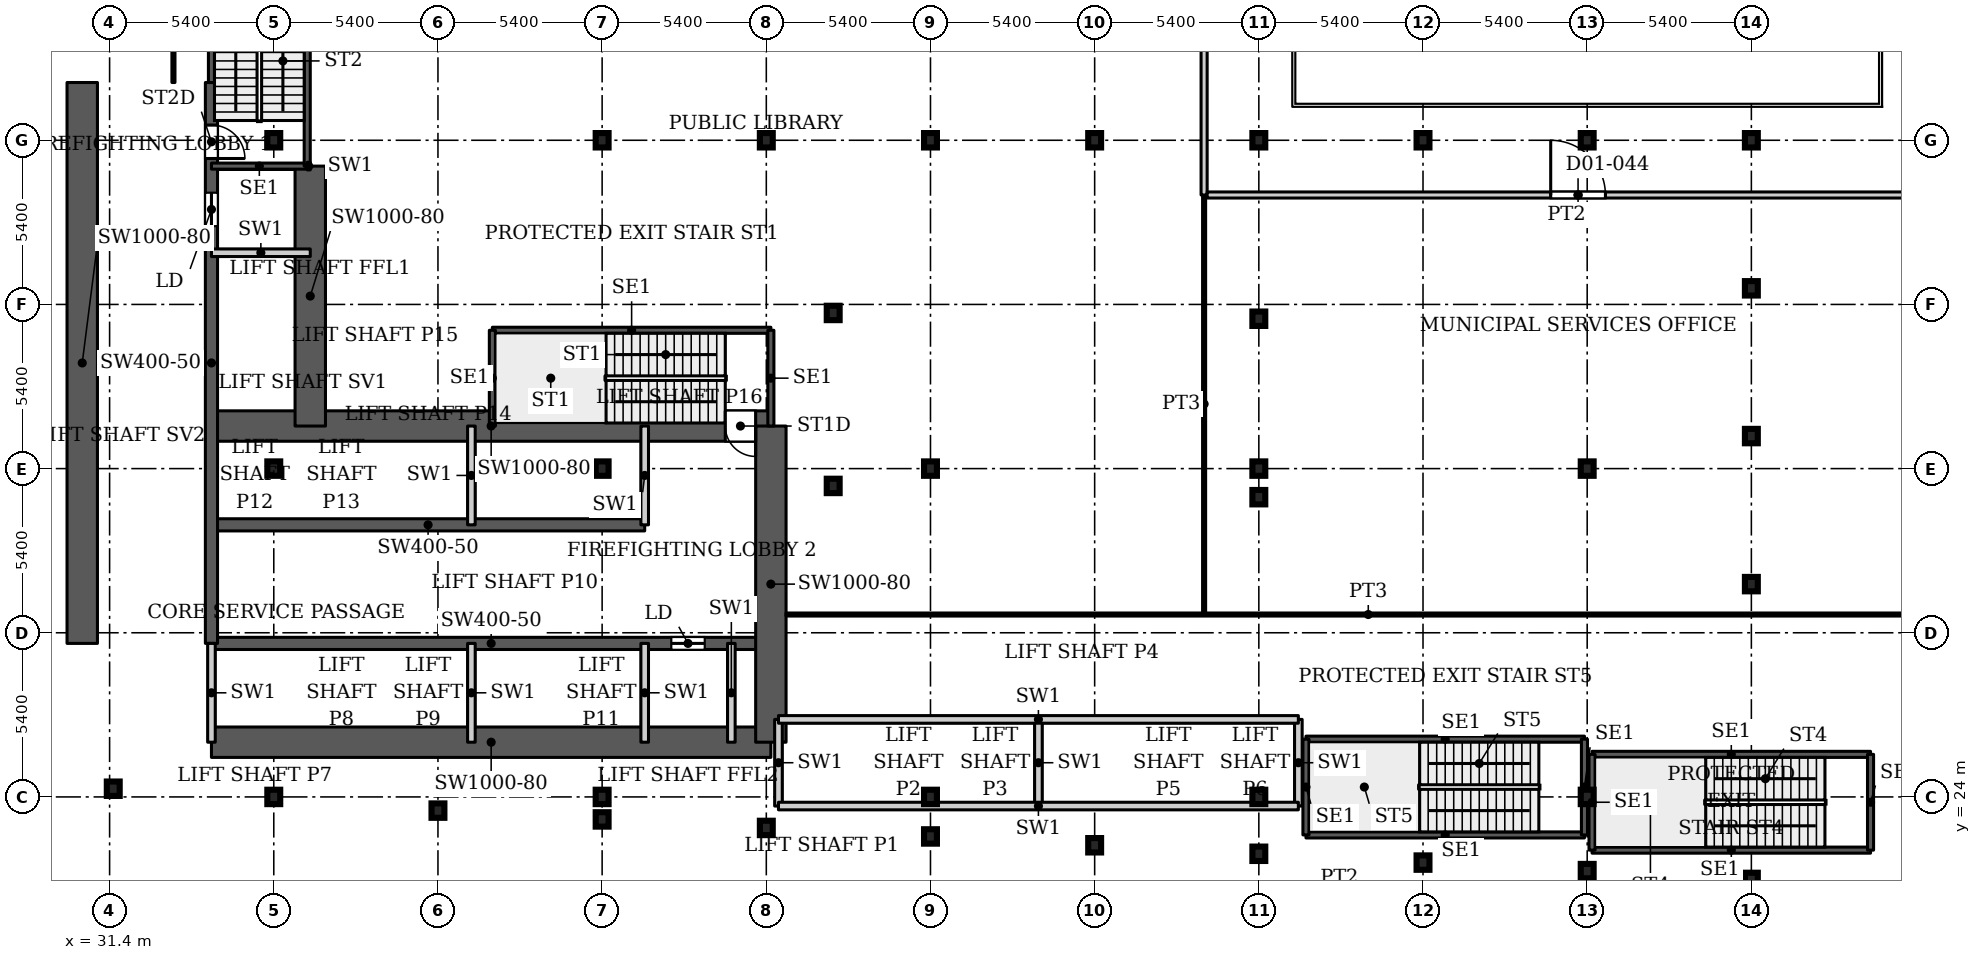
"""IFC4 building model, lengths in metres.
Left out: names, types, materials, properties, quantities, classifications, styles, units other than length and angle.
Written with IfcOpenShell. Run it as: python <this file> out.ifc"""

import sys

from ifc_helpers import new_model, si_unit, direction, frame, frame_2d, origin, origin_2d, place, context, subcontext, project, spatial, rectangle, i_section, extrude, source, transform, mapped, element, fill, save


model = new_model("IFC4")
c1 = context("Model", 3, precision=1e-05, world=origin(), true_north=direction((0.0, 1.0)))
c2 = subcontext(c1, "Body", "Model", "MODEL_VIEW")
j1 = project(units=[si_unit("LENGTHUNIT", "METRE"), si_unit("PLANEANGLEUNIT", "RADIAN")], contexts=[c1])
p1 = place(None, origin())
s1 = spatial("IfcSite", under=j1, at=p1, CompositionType="ELEMENT")
p2 = place(p1, origin())
s2 = spatial("IfcBuilding", under=s1, at=p2, CompositionType="ELEMENT")
p3 = place(p2, frame((0.0, 0.0, 7.5)))
s3 = spatial("IfcBuildingStorey", under=s2, at=p3, CompositionType="ELEMENT", Elevation=7.5)
for number, where, z_axis, x_axis in (
    (1, (36.8, 24.0, 0.0), (0.0, 0.0, 1.0), (1.0, 0.0, 0.0)),
    (2, (47.6, 24.0, 0.0), (0.0, 0.0, 1.0), (1.0, 0.0, 0.0)),
    (3, (58.4, 24.0, 0.0), (0.0, 0.0, 1.0), (1.0, 0.0, 0.0)),
    (4, (69.2, 24.0, 0.0), (0.0, 0.0, 1.0), (1.0, 0.0, 0.0)),
    (5, (80.0, 24.0, 0.0), (0.0, 0.0, 1.0), (1.0, 0.0, 0.0)),
    (6, (36.8, 34.8, 0.0), (0.0, 0.0, 1.0), (1.0, 0.0, 0.0)),
    (7, (47.6, 34.8, 0.0), (0.0, 0.0, 1.0), (1.0, 0.0, 0.0)),
    (8, (58.4, 34.8, 0.0), (0.0, 0.0, 1.0), (1.0, 0.0, 0.0)),
    (9, (69.2, 34.8, 0.0), (0.0, 0.0, 1.0), (1.0, 0.0, 0.0)),
    (10, (80.0, 34.8, 0.0), (0.0, 0.0, 1.0), (1.0, 0.0, 0.0)),
    (11, (36.8, 45.6, 0.0), (0.0, 0.0, 1.0), (1.0, 0.0, 0.0)),
    (12, (47.6, 45.6, 0.0), (0.0, 0.0, 1.0), (1.0, 0.0, 0.0)),
    (13, (58.4, 45.6, 0.0), (0.0, 0.0, 1.0), (1.0, 0.0, 0.0)),
    (14, (69.2, 45.6, 0.0), (0.0, 0.0, 1.0), (1.0, 0.0, 0.0)),
    (15, (80.0, 45.6, 0.0), (0.0, 0.0, 1.0), (1.0, 0.0, 0.0)),
    (16, (85.4, 21.27, 0.0), (0.0, 0.0, 1.0), (1.0, 0.0, 0.0)),
    (17, (80.0, 21.56, 0.0), (0.0, 0.0, 1.0), (1.0, 0.0, 0.0)),
    (18, (74.6, 21.84, 0.0), (0.0, 0.0, 1.0), (1.0, 0.0, 0.0)),
    (19, (69.2, 22.13, 0.0), (0.0, 0.0, 1.0), (1.0, 0.0, 0.0)),
    (20, (63.8, 22.41, 0.0), (0.0, 0.0, 1.0), (1.0, 0.0, 0.0)),
    (21, (58.4, 22.7, 0.0), (0.0, 0.0, 1.0), (1.0, 0.0, 0.0)),
    (22, (53.0, 22.98, 0.0), (0.0, 0.0, 1.0), (1.0, 0.0, 0.0)),
    (23, (47.6, 23.26, 0.0), (0.0, 0.0, 1.0), (1.0, 0.0, 0.0)),
    (24, (42.2, 23.55, 0.0), (0.0, 0.0, 1.0), (1.0, 0.0, 0.0)),
    (25, (31.52, 24.27, 0.0), (0.0, 0.0, 1.0), (1.0, 0.0, 0.0)),
    (26, (53.0, 45.6, 0.0), (0.0, 0.0, 1.0), (1.0, 0.0, 0.0)),
    (27, (63.8, 45.6, 0.0), (0.0, 0.0, 1.0), (1.0, 0.0, 0.0)),
    (28, (74.6, 45.6, 0.0), (0.0, 0.0, 1.0), (1.0, 0.0, 0.0)),
    (29, (85.4, 45.6, 0.0), (0.0, 0.0, 1.0), (1.0, 0.0, 0.0)),
    (30, (85.4, 31.0, 0.0), (0.0, 0.0, 1.0), (1.0, 0.0, 0.0)),
    (31, (69.2, 33.86, 0.0), (0.0, 0.0, 1.0), (1.0, 0.0, 0.0)),
    (32, (55.2, 34.23, 0.0), (0.0, 0.0, 1.0), (1.0, 0.0, 0.0)),
    (33, (85.4, 35.87, 0.0), (0.0, 0.0, 1.0), (1.0, 0.0, 0.0)),
    (34, (69.2, 39.73, 0.0), (0.0, 0.0, 1.0), (1.0, 0.0, 0.0)),
    (35, (55.2, 39.92, 0.0), (0.0, 0.0, 1.0), (1.0, 0.0, 0.0)),
    (36, (85.4, 40.73, 0.0), (0.0, 0.0, 1.0), (1.0, 0.0, 0.0)),
):
    element("IfcColumn", number, at=place(p3, frame(where, z_axis=z_axis, x_axis=x_axis)), inside=s3, PredefinedType="COLUMN", context=c2, shape_type="SweptSolid", body=[
        extrude(i_section(OverallWidth=0.424, OverallDepth=0.474, WebThickness=0.048, FlangeThickness=0.077, FilletRadius=0.014, at=origin_2d()), origin(), (0.0, 0.0, 1.0), 5.0),
    ])
p4 = place(p3, frame((34.75, 25.8, 0.0), z_axis=(0.0, 0.0, 1.0), x_axis=(1.0, 0.0, 0.0)))
e37 = element("IfcWall", 37, at=p4, inside=s3, PredefinedType="SHEAR", context=c2, shape_type="SweptSolid", body=[
    extrude(rectangle(XDim=18.4, YDim=1.0, at=frame_2d((9.2, 0.0))), origin(), (0.0, 0.0, 1.0), 5.0),
])
p5 = place(p3, frame((34.75, 29.05, 0.0), z_axis=(0.0, 0.0, 1.0), x_axis=(1.0, 0.0, 0.0)))
e38 = element("IfcWall", 38, at=p5, inside=s3, PredefinedType="SHEAR", context=c2, shape_type="SweptSolid", body=[
    extrude(rectangle(XDim=18.4, YDim=0.4, at=frame_2d((9.2, 0.0))), origin(), (0.0, 0.0, 1.0), 5.0),
])
p6 = place(p5, frame((15.125, 0.0, 0.0)))
e39 = element("IfcOpeningElement", 39, at=p6, cuts=e38, PredefinedType="OPENING", context=c2, shape_type="SweptSolid", body=[
    extrude(rectangle(XDim=1.1, YDim=2.2, at=frame_2d((0.55, 1.1))), frame((0.0, 0.21, 0.0), z_axis=(0.0, -1.0, 0.0), x_axis=(1.0, 0.0, 0.0)), (0.0, 0.0, 1.0), 0.42),
])
p7 = place(p3, frame((34.75, 32.95, 0.0), z_axis=(0.0, 0.0, 1.0), x_axis=(1.0, 0.0, 0.0)))
e40 = element("IfcWall", 40, at=p7, inside=s3, PredefinedType="SHEAR", context=c2, shape_type="SweptSolid", body=[
    extrude(rectangle(XDim=14.25, YDim=0.4, at=frame_2d((7.125, 0.0))), origin(), (0.0, 0.0, 1.0), 5.0),
])
p8 = place(p3, frame((34.75, 36.2, 0.0), z_axis=(0.0, 0.0, 1.0), x_axis=(1.0, 0.0, 0.0)))
e41 = element("IfcWall", 41, at=p8, inside=s3, PredefinedType="SHEAR", context=c2, shape_type="SweptSolid", body=[
    extrude(rectangle(XDim=18.4, YDim=1.0, at=frame_2d((9.2, 0.0))), origin(), (0.0, 0.0, 1.0), 5.0),
])
p9 = place(p8, frame((16.9, 0.0, 0.0)))
e42 = element("IfcOpeningElement", 42, at=p9, cuts=e41, PredefinedType="OPENING", context=c2, shape_type="SweptSolid", body=[
    extrude(rectangle(XDim=1.0, YDim=2.2, at=frame_2d((0.5, 1.1))), frame((0.0, 0.51, 0.0), z_axis=(0.0, -1.0, 0.0), x_axis=(1.0, 0.0, 0.0)), (0.0, 0.0, 1.0), 1.02),
])
p10 = place(p3, frame((34.75, 29.05, 0.0), z_axis=(0.0, 0.0, 1.0), x_axis=(0.0, 1.0, 0.0)))
e43 = element("IfcWall", 43, at=p10, inside=s3, PredefinedType="SHEAR", context=c2, shape_type="SweptSolid", body=[
    extrude(rectangle(XDim=18.45, YDim=0.4, at=frame_2d((9.225, 0.0))), origin(), (0.0, 0.0, 1.0), 5.0),
])
p11 = place(p10, frame((13.725, 0.0, 0.0)))
e44 = element("IfcOpeningElement", 44, at=p11, cuts=e43, PredefinedType="OPENING", context=c2, shape_type="SweptSolid", body=[
    extrude(rectangle(XDim=1.1, YDim=2.2, at=frame_2d((0.55, 1.1))), frame((0.0, 0.21, 0.0), z_axis=(0.0, -1.0, 0.0), x_axis=(1.0, 0.0, 0.0)), (0.0, 0.0, 1.0), 0.42),
])
p12 = place(p10, frame((15.95, 0.0, 0.0)))
e45 = element("IfcOpeningElement", 45, at=p12, cuts=e43, PredefinedType="OPENING", context=c2, shape_type="SweptSolid", body=[
    extrude(rectangle(XDim=1.1, YDim=2.2, at=frame_2d((0.55, 1.1))), frame((0.0, 0.21, 0.0), z_axis=(0.0, -1.0, 0.0), x_axis=(1.0, 0.0, 0.0)), (0.0, 0.0, 1.0), 0.42),
])
p13 = place(p3, frame((38.0, 36.2, 0.0), z_axis=(0.0, 0.0, 1.0), x_axis=(0.0, 1.0, 0.0)))
e46 = element("IfcWall", 46, at=p13, inside=s3, PredefinedType="SHEAR", context=c2, shape_type="SweptSolid", body=[
    extrude(rectangle(XDim=8.55, YDim=1.0, at=frame_2d((4.275, 0.0))), origin(), (0.0, 0.0, 1.0), 5.0),
])
p14 = place(p3, frame((30.5, 29.05, 0.0), z_axis=(0.0, 0.0, 1.0), x_axis=(0.0, 1.0, 0.0)))
e47 = element("IfcWall", 47, at=p14, inside=s3, PredefinedType="SHEAR", context=c2, shape_type="SweptSolid", body=[
    extrude(rectangle(XDim=18.45, YDim=1.0, at=frame_2d((9.225, 0.0))), origin(), (0.0, 0.0, 1.0), 5.0),
])
p15 = place(p3, frame((53.15, 25.8, 0.0), z_axis=(0.0, 0.0, 1.0), x_axis=(0.0, 1.0, 0.0)))
e48 = element("IfcWall", 48, at=p15, inside=s3, PredefinedType="SHEAR", context=c2, shape_type="SweptSolid", body=[
    extrude(rectangle(XDim=10.4, YDim=1.0, at=frame_2d((5.2, 0.0))), origin(), (0.0, 0.0, 1.0), 5.0),
])
p16 = place(p3, frame((43.99, 39.35, 0.0), z_axis=(0.0, 0.0, 1.0), x_axis=(1.0, 0.0, 0.0)))
e49 = element("IfcWall", 49, at=p16, inside=s3, PredefinedType="SHEAR", context=c2, shape_type="SweptSolid", body=[
    extrude(rectangle(XDim=9.16, YDim=0.2, at=frame_2d((4.58, 0.0))), origin(), (0.0, 0.0, 1.0), 5.0),
])
for number, where, z_axis, x_axis in (
    (50, (43.99, 36.2, 0.0), (0.0, 0.0, 1.0), (0.0, 1.0, 0.0)),
    (51, (53.15, 36.2, 0.0), (0.0, 0.0, 1.0), (0.0, 1.0, 0.0)),
):
    element("IfcWall", number, at=place(p3, frame(where, z_axis=z_axis, x_axis=x_axis)), inside=s3, PredefinedType="SHEAR", context=c2, shape_type="SweptSolid", body=[
        extrude(rectangle(XDim=3.15, YDim=0.2, at=frame_2d((1.575, 0.0))), origin(), (0.0, 0.0, 1.0), 5.0),
    ])
p17 = place(p3, frame((34.75, 44.75, 0.0), z_axis=(0.0, 0.0, 1.0), x_axis=(1.0, 0.0, 0.0)))
e52 = element("IfcWall", 52, at=p17, inside=s3, PredefinedType="SHEAR", context=c2, shape_type="SweptSolid", body=[
    extrude(rectangle(XDim=3.15, YDim=0.2, at=frame_2d((1.575, 0.0))), origin(), (0.0, 0.0, 1.0), 5.0),
])
p18 = place(p3, frame((34.75, 47.5, 0.0), z_axis=(0.0, 0.0, 1.0), x_axis=(0.0, 1.0, 0.0)))
e53 = element("IfcWall", 53, at=p18, inside=s3, PredefinedType="SHEAR", context=c2, shape_type="SweptSolid", body=[
    extrude(rectangle(XDim=6.41, YDim=0.2, at=frame_2d((3.205, 0.0))), origin(), (0.0, 0.0, 1.0), 5.0),
])
p19 = place(p3, frame((37.9, 44.75, 0.0), z_axis=(0.0, 0.0, 1.0), x_axis=(0.0, 1.0, 0.0)))
e54 = element("IfcWall", 54, at=p19, inside=s3, PredefinedType="SHEAR", context=c2, shape_type="SweptSolid", body=[
    extrude(rectangle(XDim=9.16, YDim=0.2, at=frame_2d((4.58, 0.0))), origin(), (0.0, 0.0, 1.0), 5.0),
])
for number, where, z_axis, x_axis in (
    (55, (80.16, 22.25, 0.0), (0.0, 0.0, 1.0), (1.0, 0.0, 0.0)),
    (56, (80.16, 25.4, 0.0), (0.0, 0.0, 1.0), (1.0, 0.0, 0.0)),
):
    element("IfcWall", number, at=place(p3, frame(where, z_axis=z_axis, x_axis=x_axis)), inside=s3, PredefinedType="SHEAR", context=c2, shape_type="SweptSolid", body=[
        extrude(rectangle(XDim=9.16, YDim=0.2, at=frame_2d((4.58, 0.0))), origin(), (0.0, 0.0, 1.0), 5.0),
    ])
for number, where, z_axis, x_axis in (
    (57, (80.16, 22.25, 0.0), (0.0, 0.0, 1.0), (0.0, 1.0, 0.0)),
    (58, (89.32, 22.25, 0.0), (0.0, 0.0, 1.0), (0.0, 1.0, 0.0)),
):
    element("IfcWall", number, at=place(p3, frame(where, z_axis=z_axis, x_axis=x_axis)), inside=s3, PredefinedType="SHEAR", context=c2, shape_type="SweptSolid", body=[
        extrude(rectangle(XDim=3.15, YDim=0.2, at=frame_2d((1.575, 0.0))), origin(), (0.0, 0.0, 1.0), 5.0),
    ])
for number, where, z_axis, x_axis in (
    (59, (70.75, 22.75, 0.0), (0.0, 0.0, 1.0), (1.0, 0.0, 0.0)),
    (60, (70.75, 25.9, 0.0), (0.0, 0.0, 1.0), (1.0, 0.0, 0.0)),
):
    element("IfcWall", number, at=place(p3, frame(where, z_axis=z_axis, x_axis=x_axis)), inside=s3, PredefinedType="SHEAR", context=c2, shape_type="SweptSolid", body=[
        extrude(rectangle(XDim=9.16, YDim=0.2, at=frame_2d((4.58, 0.0))), origin(), (0.0, 0.0, 1.0), 5.0),
    ])
for number, where, z_axis, x_axis in (
    (61, (70.75, 22.75, 0.0), (0.0, 0.0, 1.0), (0.0, 1.0, 0.0)),
    (62, (79.91, 22.75, 0.0), (0.0, 0.0, 1.0), (0.0, 1.0, 0.0)),
):
    element("IfcWall", number, at=place(p3, frame(where, z_axis=z_axis, x_axis=x_axis)), inside=s3, PredefinedType="SHEAR", context=c2, shape_type="SweptSolid", body=[
        extrude(rectangle(XDim=3.15, YDim=0.2, at=frame_2d((1.575, 0.0))), origin(), (0.0, 0.0, 1.0), 5.0),
    ])
for number, where, z_axis, x_axis in (
    (63, (34.75, 25.8, 0.0), (0.0, 0.0, 1.0), (0.0, 1.0, 0.0)),
    (64, (43.3, 25.8, 0.0), (0.0, 0.0, 1.0), (0.0, 1.0, 0.0)),
    (65, (43.3, 32.95, 0.0), (0.0, 0.0, 1.0), (0.0, 1.0, 0.0)),
    (66, (49.0, 25.8, 0.0), (0.0, 0.0, 1.0), (0.0, 1.0, 0.0)),
    (67, (49.0, 32.95, 0.0), (0.0, 0.0, 1.0), (0.0, 1.0, 0.0)),
    (68, (51.85, 25.8, 0.0), (0.0, 0.0, 1.0), (0.0, 1.0, 0.0)),
):
    element("IfcWall", number, at=place(p3, frame(where, z_axis=z_axis, x_axis=x_axis)), inside=s3, PredefinedType="PARTITIONING", context=c2, shape_type="SweptSolid", body=[
        extrude(rectangle(XDim=3.25, YDim=0.25, at=frame_2d((1.625, 0.0))), origin(), (0.0, 0.0, 1.0), 5.0),
    ])
for number, where, z_axis, x_axis in (
    (69, (53.4, 23.7, 0.0), (0.0, 0.0, 1.0), (0.0, 1.0, 0.0)),
    (70, (61.95, 23.7, 0.0), (0.0, 0.0, 1.0), (0.0, 1.0, 0.0)),
    (71, (70.5, 23.7, 0.0), (0.0, 0.0, 1.0), (0.0, 1.0, 0.0)),
):
    element("IfcWall", number, at=place(p3, frame(where, z_axis=z_axis, x_axis=x_axis)), inside=s3, PredefinedType="PARTITIONING", context=c2, shape_type="SweptSolid", body=[
        extrude(rectangle(XDim=2.85, YDim=0.25, at=frame_2d((1.425, 0.0))), origin(), (0.0, 0.0, 1.0), 5.0),
    ])
for number, where, z_axis, x_axis in (
    (72, (53.4, 23.7, 0.0), (0.0, 0.0, 1.0), (1.0, 0.0, 0.0)),
    (73, (53.4, 26.55, 0.0), (0.0, 0.0, 1.0), (1.0, 0.0, 0.0)),
):
    element("IfcWall", number, at=place(p3, frame(where, z_axis=z_axis, x_axis=x_axis)), inside=s3, PredefinedType="PARTITIONING", context=c2, shape_type="SweptSolid", body=[
        extrude(rectangle(XDim=17.1, YDim=0.25, at=frame_2d((8.55, 0.0))), origin(), (0.0, 0.0, 1.0), 5.0),
    ])
p20 = place(p3, frame((34.75, 41.9, 0.0), z_axis=(0.0, 0.0, 1.0), x_axis=(1.0, 0.0, 0.0)))
e74 = element("IfcWall", 74, at=p20, inside=s3, PredefinedType="PARTITIONING", context=c2, shape_type="SweptSolid", body=[
    extrude(rectangle(XDim=3.25, YDim=0.25, at=frame_2d((1.625, 0.0))), origin(), (0.0, 0.0, 1.0), 5.0),
])
p21 = place(p3, frame((37.9, 44.75, 0.0), z_axis=(0.0, 0.0, 1.0), x_axis=(1.0, 0.0, 0.0)))
e75 = element("IfcWall", 75, at=p21, inside=s3, PredefinedType="PARTITIONING", context=c2, shape_type="SweptSolid", body=[
    extrude(rectangle(XDim=0.1, YDim=0.25, at=frame_2d((0.05, 0.0))), origin(), (0.0, 0.0, 1.0), 5.0),
])
p22 = place(p3, frame((33.5, 47.5, 0.0), z_axis=(0.0, 0.0, 1.0), x_axis=(0.0, 1.0, 0.0)))
e76 = element("IfcWall", 76, at=p22, inside=s3, PredefinedType="PARTITIONING", context=c2, shape_type="SweptSolid", body=[
    extrude(rectangle(XDim=12.45, YDim=0.1, at=frame_2d((6.225, 0.0))), origin(), (0.0, 0.0, 1.0), 4.68),
])
p23 = place(p3, frame((53.649, 30.0, 0.0), z_axis=(0.0, 0.0, 1.0), x_axis=(1.0, 0.0, 0.0)))
e77 = element("IfcWall", 77, at=p23, inside=s3, PredefinedType="PARTITIONING", context=c2, shape_type="SweptSolid", body=[
    extrude(rectangle(XDim=38.301, YDim=0.1, at=frame_2d((19.15, 0.0))), origin(), (0.0, 0.0, 1.0), 4.68),
])
p24 = place(p3, frame((67.4, 30.05, 0.0), z_axis=(0.0, 0.0, 1.0), x_axis=(0.0, 1.0, 0.0)))
e78 = element("IfcWall", 78, at=p24, inside=s3, PredefinedType="PARTITIONING", context=c2, shape_type="SweptSolid", body=[
    extrude(rectangle(XDim=13.75, YDim=0.1, at=frame_2d((6.875, 0.0))), origin(), (0.0, 0.0, 1.0), 4.68),
])
p25 = place(p3, frame((67.4, 43.8, 0.0), z_axis=(0.0, 0.0, 1.0), x_axis=(0.0, 1.0, 0.0)))
e79 = element("IfcWall", 79, at=p25, inside=s3, PredefinedType="PARTITIONING", context=c2, shape_type="SweptSolid", body=[
    extrude(rectangle(XDim=25.2, YDim=0.2, at=frame_2d((12.6, 0.0))), origin(), (0.0, 0.0, 1.0), 4.68),
])
p26 = place(p25, frame((7.25, 0.0, 0.0)))
e80 = element("IfcOpeningElement", 80, at=p26, cuts=e79, PredefinedType="OPENING", context=c2, shape_type="SweptSolid", body=[
    extrude(rectangle(XDim=1.8, YDim=2.1, at=frame_2d((0.9, 1.05))), frame((0.0, 0.11, 0.0), z_axis=(0.0, -1.0, 0.0), x_axis=(1.0, 0.0, 0.0)), (0.0, 0.0, 1.0), 0.22),
])
p27 = place(p25, frame((19.75, 0.0, 0.0)))
e81 = element("IfcOpeningElement", 81, at=p27, cuts=e79, PredefinedType="OPENING", context=c2, shape_type="SweptSolid", body=[
    extrude(rectangle(XDim=1.8, YDim=2.1, at=frame_2d((0.9, 1.05))), frame((0.0, 0.11, 0.0), z_axis=(0.0, -1.0, 0.0), x_axis=(1.0, 0.0, 0.0)), (0.0, 0.0, 1.0), 0.22),
])
p28 = place(p3, frame((67.5, 43.8, 0.0), z_axis=(0.0, 0.0, 1.0), x_axis=(1.0, 0.0, 0.0)))
e82 = element("IfcWall", 82, at=p28, inside=s3, PredefinedType="PARTITIONING", context=c2, shape_type="SweptSolid", body=[
    extrude(rectangle(XDim=24.4, YDim=0.2, at=frame_2d((12.2, 0.0))), origin(), (0.0, 0.0, 1.0), 4.68),
])
p29 = place(p28, frame((11.3, 0.0, 0.0)))
e83 = element("IfcOpeningElement", 83, at=p29, cuts=e82, PredefinedType="OPENING", context=c2, shape_type="SweptSolid", body=[
    extrude(rectangle(XDim=1.8, YDim=2.1, at=frame_2d((0.9, 1.05))), frame((0.0, 0.11, 0.0), z_axis=(0.0, -1.0, 0.0), x_axis=(1.0, 0.0, 0.0)), (0.0, 0.0, 1.0), 0.22),
])
m1 = source(origin(), c2, "Body", "SweptSolid", [
    extrude(rectangle(XDim=1.1, YDim=2.2, at=frame_2d((0.55, 1.1))), frame((0.0, 0.025, 0.0), z_axis=(0.0, -1.0, 0.0), x_axis=(1.0, 0.0, 0.0)), (0.0, 0.0, 1.0), 0.05),
])
p30 = place(p11, origin())
e84 = element("IfcDoor", 84, at=p30, inside=s3, OperationType="SLIDING_TO_LEFT", PredefinedType="DOOR", context=c2, shape_type="MappedRepresentation", body=[
    mapped(m1, transform((0.0, 0.0, 0.0), x_axis=(1.0, 0.0, 0.0), y_axis=(0.0, 1.0, 0.0), z_axis=(0.0, 0.0, 1.0), scale=1.0)),
])
fill(e44, e84)
p31 = place(p6, origin())
e85 = element("IfcDoor", 85, at=p31, inside=s3, OperationType="SLIDING_TO_LEFT", PredefinedType="DOOR", context=c2, shape_type="MappedRepresentation", body=[
    mapped(m1, transform((0.0, 0.0, 0.0), x_axis=(1.0, 0.0, 0.0), y_axis=(0.0, 1.0, 0.0), z_axis=(0.0, 0.0, 1.0), scale=1.0)),
])
fill(e39, e85)
m2 = source(origin(), c2, "Body", "SweptSolid", [
    extrude(rectangle(XDim=1.0, YDim=2.2, at=frame_2d((0.5, 1.1))), frame((0.0, 0.025, 0.0), z_axis=(0.0, -1.0, 0.0), x_axis=(1.0, 0.0, 0.0)), (0.0, 0.0, 1.0), 0.05),
])
p32 = place(p9, origin())
e86 = element("IfcDoor", 86, at=p32, inside=s3, OperationType="SINGLE_SWING_RIGHT", PredefinedType="DOOR", context=c2, shape_type="MappedRepresentation", body=[
    mapped(m2, transform((0.0, 0.0, 0.0), x_axis=(1.0, 0.0, 0.0), y_axis=(0.0, 1.0, 0.0), z_axis=(0.0, 0.0, 1.0), scale=1.0)),
])
fill(e42, e86)
m3 = source(origin(), c2, "Body", "SweptSolid", [
    extrude(rectangle(XDim=1.1, YDim=2.2, at=frame_2d((0.55, 1.1))), frame((0.0, 0.025, 0.0), z_axis=(0.0, -1.0, 0.0), x_axis=(1.0, 0.0, 0.0)), (0.0, 0.0, 1.0), 0.05),
])
p33 = place(p12, origin())
e87 = element("IfcDoor", 87, at=p33, inside=s3, OperationType="SINGLE_SWING_RIGHT", PredefinedType="DOOR", context=c2, shape_type="MappedRepresentation", body=[
    mapped(m3, transform((0.0, 0.0, 0.0), x_axis=(1.0, 0.0, 0.0), y_axis=(0.0, 1.0, 0.0), z_axis=(0.0, 0.0, 1.0), scale=1.0)),
])
fill(e45, e87)
m4 = source(origin(), c2, "Body", "SweptSolid", [
    extrude(rectangle(XDim=1.8, YDim=2.1, at=frame_2d((0.9, 1.05))), frame((0.0, 0.025, 0.0), z_axis=(0.0, -1.0, 0.0), x_axis=(1.0, 0.0, 0.0)), (0.0, 0.0, 1.0), 0.05),
])
p34 = place(p29, origin())
e88 = element("IfcDoor", 88, at=p34, inside=s3, OperationType="DOUBLE_DOOR_SINGLE_SWING", PredefinedType="DOOR", context=c2, shape_type="MappedRepresentation", body=[
    mapped(m4, transform((0.0, 0.0, 0.0), x_axis=(1.0, 0.0, 0.0), y_axis=(0.0, 1.0, 0.0), z_axis=(0.0, 0.0, 1.0), scale=1.0)),
])
fill(e83, e88)
save(model, sys.argv[1])
